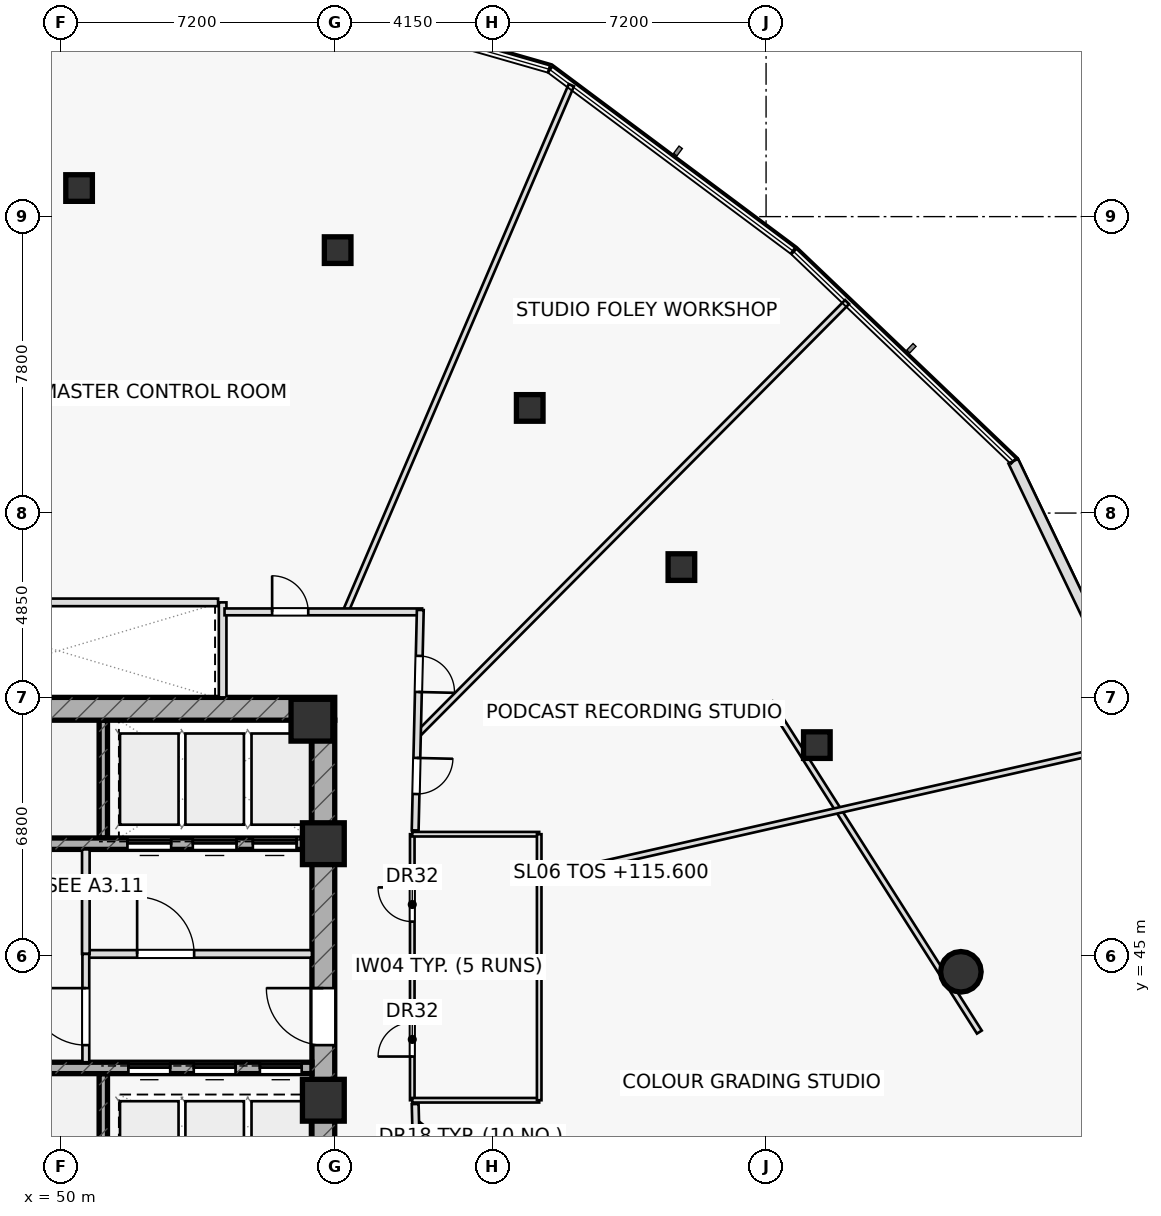
"""IFC4 building model, lengths in metres.
Left out: names, types, materials, properties, quantities, classifications, styles, units other than length and angle.
Written with IfcOpenShell. Run it as: python <this file> out.ifc"""

import sys

from ifc_helpers import new_model, si_unit, direction, frame, frame_2d, origin, origin_2d, place, context, subcontext, project, spatial, rectangle, hollow_rectangle, hollow_circle, extrude, element, fill, save


model = new_model("IFC4")
c1 = context("Model", 3, precision=1e-05, world=origin(), true_north=direction((0.0, 1.0)))
c2 = subcontext(c1, "Body", "Model", "MODEL_VIEW")
j1 = project(units=[si_unit("LENGTHUNIT", "METRE"), si_unit("PLANEANGLEUNIT", "RADIAN")], contexts=[c1])
p1 = place(None, origin())
s1 = spatial("IfcSite", under=j1, at=p1, CompositionType="ELEMENT")
p2 = place(p1, origin())
s2 = spatial("IfcBuilding", under=s1, at=p2, CompositionType="ELEMENT")
p3 = place(p2, frame((0.0, 0.0, 115.6)))
s3 = spatial("IfcBuildingStorey", under=s2, at=p3, CompositionType="ELEMENT", Elevation=115.6)
for number, where, z_axis, x_axis in (
    (1, (51.11, 48.1, 0.0), (0.0, 0.0, 1.0), (0.0, 1.0, 0.0)),
    (2, (51.11, 38.8, 0.0), (0.0, 0.0, 1.0), (0.0, 1.0, 0.0)),
):
    element("IfcWall", number, at=place(p3, frame(where, z_axis=z_axis, x_axis=x_axis)), inside=s3, PredefinedType="SHEAR", context=c2, shape_type="SweptSolid", body=[
        extrude(rectangle(XDim=3.1, YDim=0.22, at=frame_2d((1.55, 0.0))), origin(), (0.0, 0.0, 1.0), 3.55),
    ])
p4 = place(p3, frame((42.8, 51.5, 0.0), z_axis=(0.0, 0.0, 1.0), x_axis=(1.0, 0.0, 0.0)))
e3 = element("IfcWall", 3, at=p4, inside=s3, PredefinedType="SHEAR", context=c2, shape_type="SweptSolid", body=[
    extrude(rectangle(XDim=14.4, YDim=0.6, at=frame_2d((7.2, 0.0))), origin(), (0.0, 0.0, 1.0), 3.55),
])
p5 = place(p4, frame((0.88, 0.0, 0.0)))
e4 = element("IfcOpeningElement", 4, at=p5, cuts=e3, PredefinedType="OPENING", context=c2, shape_type="SweptSolid", body=[
    extrude(rectangle(XDim=1.05, YDim=2.2, at=frame_2d((0.525, 1.1))), frame((0.0, 0.31, 0.0), z_axis=(0.0, -1.0, 0.0), x_axis=(1.0, 0.0, 0.0)), (0.0, 0.0, 1.0), 0.62),
])
p6 = place(p3, frame((56.9, 38.8, 0.0), z_axis=(0.0, 0.0, 1.0), x_axis=(0.0, 1.0, 0.0)))
e5 = element("IfcWall", 5, at=p6, inside=s3, PredefinedType="SHEAR", context=c2, shape_type="SweptSolid", body=[
    extrude(rectangle(XDim=12.4, YDim=0.6, at=frame_2d((6.2, 0.0))), origin(), (0.0, 0.0, 1.0), 3.55),
])
p7 = place(p6, frame((3.85, 0.0, 0.0)))
e6 = element("IfcOpeningElement", 6, at=p7, cuts=e5, PredefinedType="OPENING", context=c2, shape_type="SweptSolid", body=[
    extrude(rectangle(XDim=1.5, YDim=2.2, at=frame_2d((0.75, 1.1))), frame((0.0, 0.31, 0.0), z_axis=(0.0, -1.0, 0.0), x_axis=(1.0, 0.0, 0.0)), (0.0, 0.0, 1.0), 0.62),
])
p8 = place(p3, frame((43.4, 47.95, 0.0), z_axis=(0.0, 0.0, 1.0), x_axis=(1.0, 0.0, 0.0)))
e7 = element("IfcWall", 7, at=p8, inside=s3, PredefinedType="SHEAR", context=c2, shape_type="SweptSolid", body=[
    extrude(rectangle(XDim=13.2, YDim=0.3, at=frame_2d((6.6, 0.0))), origin(), (0.0, 0.0, 1.0), 3.55),
])
p9 = place(p8, frame((8.345, 0.0, 0.0)))
e8 = element("IfcOpeningElement", 8, at=p9, cuts=e7, PredefinedType="OPENING", context=c2, shape_type="SweptSolid", body=[
    extrude(rectangle(XDim=1.15, YDim=2.2, at=frame_2d((0.575, 1.1))), frame((0.0, 0.16, 0.0), z_axis=(0.0, -1.0, 0.0), x_axis=(1.0, 0.0, 0.0)), (0.0, 0.0, 1.0), 0.32),
])
p10 = place(p8, frame((10.065, 0.0, 0.0)))
e9 = element("IfcOpeningElement", 9, at=p10, cuts=e7, PredefinedType="OPENING", context=c2, shape_type="SweptSolid", body=[
    extrude(rectangle(XDim=1.15, YDim=2.2, at=frame_2d((0.575, 1.1))), frame((0.0, 0.16, 0.0), z_axis=(0.0, -1.0, 0.0), x_axis=(1.0, 0.0, 0.0)), (0.0, 0.0, 1.0), 0.32),
])
p11 = place(p8, frame((11.645, 0.0, 0.0)))
e10 = element("IfcOpeningElement", 10, at=p11, cuts=e7, PredefinedType="OPENING", context=c2, shape_type="SweptSolid", body=[
    extrude(rectangle(XDim=1.15, YDim=2.2, at=frame_2d((0.575, 1.1))), frame((0.0, 0.16, 0.0), z_axis=(0.0, -1.0, 0.0), x_axis=(1.0, 0.0, 0.0)), (0.0, 0.0, 1.0), 0.32),
])
p12 = place(p3, frame((43.4, 42.05, 0.0), z_axis=(0.0, 0.0, 1.0), x_axis=(1.0, 0.0, 0.0)))
e11 = element("IfcWall", 11, at=p12, inside=s3, PredefinedType="SHEAR", context=c2, shape_type="SweptSolid", body=[
    extrude(rectangle(XDim=13.2, YDim=0.3, at=frame_2d((6.6, 0.0))), origin(), (0.0, 0.0, 1.0), 3.55),
])
p13 = place(p12, frame((8.37, 0.0, 0.0)))
e12 = element("IfcOpeningElement", 12, at=p13, cuts=e11, PredefinedType="OPENING", context=c2, shape_type="SweptSolid", body=[
    extrude(rectangle(XDim=1.1, YDim=2.15, at=frame_2d((0.55, 1.075))), frame((0.0, 0.16, 0.0), z_axis=(0.0, -1.0, 0.0), x_axis=(1.0, 0.0, 0.0)), (0.0, 0.0, 1.0), 0.32),
])
p14 = place(p12, frame((10.09, 0.0, 0.0)))
e13 = element("IfcOpeningElement", 13, at=p14, cuts=e11, PredefinedType="OPENING", context=c2, shape_type="SweptSolid", body=[
    extrude(rectangle(XDim=1.1, YDim=2.15, at=frame_2d((0.55, 1.075))), frame((0.0, 0.16, 0.0), z_axis=(0.0, -1.0, 0.0), x_axis=(1.0, 0.0, 0.0)), (0.0, 0.0, 1.0), 0.32),
])
p15 = place(p12, frame((11.83, 0.0, 0.0)))
e14 = element("IfcOpeningElement", 14, at=p15, cuts=e11, PredefinedType="OPENING", context=c2, shape_type="SweptSolid", body=[
    extrude(rectangle(XDim=1.1, YDim=2.15, at=frame_2d((0.55, 1.075))), frame((0.0, 0.16, 0.0), z_axis=(0.0, -1.0, 0.0), x_axis=(1.0, 0.0, 0.0)), (0.0, 0.0, 1.0), 0.32),
])
for number, where, z_axis, x_axis in (
    (15, (56.9, 47.95, 0.0), (0.0, 0.0, 1.0), (1.0, 0.0, 0.0)),
    (16, (56.6, 51.2, 0.0), (0.0, 0.0, 1.0), (1.0, 0.0, 0.0)),
    (17, (56.9, 41.2, 0.0), (0.0, 0.0, 1.0), (1.0, 0.0, 0.0)),
):
    element("IfcColumn", number, at=place(p3, frame(where, z_axis=z_axis, x_axis=x_axis)), inside=s3, PredefinedType="COLUMN", context=c2, shape_type="SweptSolid", body=[
        extrude(rectangle(XDim=1.1, YDim=1.1, at=origin_2d()), origin(), (0.0, 0.0, 1.0), 3.55),
    ])
p16 = place(p3, frame((73.676, 44.58, 0.0), z_axis=(0.0, 0.0, 1.0), x_axis=(1.0, 0.0, 0.0)))
e18 = element("IfcColumn", 18, at=p16, inside=s3, PredefinedType="COLUMN", context=c2, shape_type="SweptSolid", body=[
    extrude(hollow_circle(Radius=0.533, WallThickness=0.045, at=origin_2d()), origin(), (0.0, 0.0, 1.0), 3.55),
])
for number, where, z_axis, x_axis in (
    (19, (69.886, 50.544, 0.0), (0.0, 0.0, 1.0), (1.0, 0.0, 0.0)),
    (20, (66.322, 55.229, 0.0), (0.0, 0.0, 1.0), (1.0, 0.0, 0.0)),
    (21, (62.331, 59.416, 0.0), (0.0, 0.0, 1.0), (1.0, 0.0, 0.0)),
    (22, (57.277, 63.568, 0.0), (0.0, 0.0, 1.0), (1.0, 0.0, 0.0)),
    (23, (50.472, 65.202, 0.0), (0.0, 0.0, 1.0), (1.0, 0.0, 0.0)),
):
    element("IfcColumn", number, at=place(p3, frame(where, z_axis=z_axis, x_axis=x_axis)), inside=s3, PredefinedType="COLUMN", context=c2, shape_type="SweptSolid", body=[
        extrude(hollow_rectangle(XDim=0.7, YDim=0.7, WallThickness=0.04, at=origin_2d()), origin(), (0.0, 0.0, 1.0), 3.55),
    ])
p17 = place(p3, frame((54.25, 51.8, 0.0), z_axis=(0.0, 0.0, 1.0), x_axis=(0.0, 1.0, 0.0)))
e24 = element("IfcWall", 24, at=p17, inside=s3, PredefinedType="PARTITIONING", context=c2, shape_type="SweptSolid", body=[
    extrude(rectangle(XDim=2.5, YDim=0.2, at=frame_2d((1.25, 0.0))), origin(), (0.0, 0.0, 1.0), 3.55),
])
p18 = place(p3, frame((50.65, 45.05, 0.0), z_axis=(0.0, 0.0, 1.0), x_axis=(1.0, 0.0, 0.0)))
e25 = element("IfcWall", 25, at=p18, inside=s3, PredefinedType="PARTITIONING", context=c2, shape_type="SweptSolid", body=[
    extrude(rectangle(XDim=5.95, YDim=0.2, at=frame_2d((2.975, 0.0))), origin(), (0.0, 0.0, 1.0), 3.55),
])
p19 = place(p18, frame((1.35, 0.0, 0.0)))
e26 = element("IfcOpeningElement", 26, at=p19, cuts=e25, PredefinedType="OPENING", context=c2, shape_type="SweptSolid", body=[
    extrude(rectangle(XDim=1.5, YDim=2.2, at=frame_2d((0.75, 1.1))), frame((0.0, 0.11, 0.0), z_axis=(0.0, -1.0, 0.0), x_axis=(1.0, 0.0, 0.0)), (0.0, 0.0, 1.0), 0.22),
])
p20 = place(p3, frame((50.65, 45.05, 0.0), z_axis=(0.0, 0.0, 1.0), x_axis=(0.0, 1.0, 0.0)))
e27 = element("IfcWall", 27, at=p20, inside=s3, PredefinedType="PARTITIONING", context=c2, shape_type="SweptSolid", body=[
    extrude(rectangle(XDim=2.75, YDim=0.2, at=frame_2d((1.375, 0.0))), origin(), (0.0, 0.0, 1.0), 3.55),
])
p21 = place(p3, frame((50.65, 42.2, 0.0), z_axis=(0.0, 0.0, 1.0), x_axis=(0.0, 1.0, 0.0)))
e28 = element("IfcWall", 28, at=p21, inside=s3, PredefinedType="PARTITIONING", context=c2, shape_type="SweptSolid", body=[
    extrude(rectangle(XDim=2.85, YDim=0.18, at=frame_2d((1.425, 0.0))), origin(), (0.0, 0.0, 1.0), 3.55),
])
p22 = place(p21, frame((0.45, 0.0, 0.0)))
e29 = element("IfcOpeningElement", 29, at=p22, cuts=e28, PredefinedType="OPENING", context=c2, shape_type="SweptSolid", body=[
    extrude(rectangle(XDim=1.5, YDim=2.2, at=frame_2d((0.75, 1.1))), frame((0.0, 0.1, 0.0), z_axis=(0.0, -1.0, 0.0), x_axis=(1.0, 0.0, 0.0)), (0.0, 0.0, 1.0), 0.2),
])
p23 = place(p3, frame((74.163, 42.993, 0.0), z_axis=(0.0, 0.0, 1.0), x_axis=(-0.53628142437, 0.844039237166, 0.0)))
e30 = element("IfcWall", 30, at=p23, inside=s3, PredefinedType="PARTITIONING", context=c2, shape_type="SweptSolid", body=[
    extrude(rectangle(XDim=10.267, YDim=0.15, at=frame_2d((5.133, 0.0))), origin(), (0.0, 0.0, 1.0), 2.835),
])
p24 = place(p3, frame((59.24, 41.2, 0.0), z_axis=(0.0, 0.0, 1.0), x_axis=(0.0, 1.0, 0.0)))
e31 = element("IfcWall", 31, at=p24, inside=s3, PredefinedType="PARTITIONING", context=c2, shape_type="SweptSolid", body=[
    extrude(rectangle(XDim=7.0, YDim=0.12, at=frame_2d((3.5, 0.0))), origin(), (0.0, 0.0, 1.0), 3.55),
])
p25 = place(p24, frame((1.15, 0.0, 0.0)))
e32 = element("IfcOpeningElement", 32, at=p25, cuts=e31, PredefinedType="OPENING", context=c2, shape_type="SweptSolid", body=[
    extrude(rectangle(XDim=0.9, YDim=2.05, at=frame_2d((0.45, 1.025))), frame((0.0, 0.07, 0.0), z_axis=(0.0, -1.0, 0.0), x_axis=(1.0, 0.0, 0.0)), (0.0, 0.0, 1.0), 0.14),
])
p26 = place(p24, frame((4.7, 0.0, 0.0)))
e33 = element("IfcOpeningElement", 33, at=p26, cuts=e31, PredefinedType="OPENING", context=c2, shape_type="SweptSolid", body=[
    extrude(rectangle(XDim=0.9, YDim=2.05, at=frame_2d((0.45, 1.025))), frame((0.0, 0.07, 0.0), z_axis=(0.0, -1.0, 0.0), x_axis=(1.0, 0.0, 0.0)), (0.0, 0.0, 1.0), 0.14),
])
for number, where, z_axis, x_axis in (
    (34, (59.24, 41.2, 0.0), (0.0, 0.0, 1.0), (1.0, 0.0, 0.0)),
    (35, (59.24, 44.65, 0.0), (0.0, 0.0, 1.0), (1.0, 0.0, 0.0)),
    (36, (59.24, 48.2, 0.0), (0.0, 0.0, 1.0), (1.0, 0.0, 0.0)),
):
    element("IfcWall", number, at=place(p3, frame(where, z_axis=z_axis, x_axis=x_axis)), inside=s3, PredefinedType="PARTITIONING", context=c2, shape_type="SweptSolid", body=[
        extrude(rectangle(XDim=3.34, YDim=0.12, at=frame_2d((1.67, 0.0))), origin(), (0.0, 0.0, 1.0), 3.55),
    ])
p27 = place(p3, frame((62.58, 41.2, 0.0), z_axis=(0.0, 0.0, 1.0), x_axis=(0.0, 1.0, 0.0)))
e37 = element("IfcWall", 37, at=p27, inside=s3, PredefinedType="PARTITIONING", context=c2, shape_type="SweptSolid", body=[
    extrude(rectangle(XDim=7.0, YDim=0.12, at=frame_2d((3.5, 0.0))), origin(), (0.0, 0.0, 1.0), 3.55),
])
p28 = place(p3, frame((59.329, 40.614, 0.0), z_axis=(0.0, 0.0, 1.0), x_axis=(0.794014010307, -0.607899458329, 0.0)))
e38 = element("IfcWall", 38, at=p28, inside=s3, PredefinedType="PARTITIONING", context=c2, shape_type="SweptSolid", body=[
    extrude(rectangle(XDim=17.42, YDim=0.15, at=frame_2d((8.71, 0.0))), origin(), (0.0, 0.0, 1.0), 2.835),
])
p29 = place(p28, frame((1.35, 0.0, 0.0)))
e39 = element("IfcOpeningElement", 39, at=p29, cuts=e38, PredefinedType="OPENING", context=c2, shape_type="SweptSolid", body=[
    extrude(rectangle(XDim=0.95, YDim=2.05, at=frame_2d((0.475, 1.025))), frame((0.0, 0.085, 0.0), z_axis=(0.0, -1.0, 0.0), x_axis=(1.0, 0.0, 0.0)), (0.0, 0.0, 1.0), 0.17),
])
p30 = place(p3, frame((62.65, 47.055, 0.0), z_axis=(0.0, 0.0, 1.0), x_axis=(0.975173795811, 0.22144089045, 0.0)))
e40 = element("IfcWall", 40, at=p30, inside=s3, PredefinedType="PARTITIONING", context=c2, shape_type="SweptSolid", body=[
    extrude(rectangle(XDim=16.337, YDim=0.15, at=frame_2d((8.168, 0.0))), origin(), (0.0, 0.0, 1.0), 2.975),
])
p31 = place(p3, frame((59.375, 50.816, 0.0), z_axis=(0.0, 0.0, 1.0), x_axis=(0.704599563608, 0.709605140176, 0.0)))
e41 = element("IfcWall", 41, at=p31, inside=s3, PredefinedType="PARTITIONING", context=c2, shape_type="SweptSolid", body=[
    extrude(rectangle(XDim=16.047, YDim=0.15, at=frame_2d((8.023, 0.0))), origin(), (0.0, 0.0, 1.0), 2.835),
])
p32 = place(p3, frame((57.482, 54.05, 0.0), z_axis=(0.0, 0.0, 1.0), x_axis=(0.394188925316, 0.919029428886, 0.0)))
e42 = element("IfcWall", 42, at=p32, inside=s3, PredefinedType="PARTITIONING", context=c2, shape_type="SweptSolid", body=[
    extrude(rectangle(XDim=15.08, YDim=0.15, at=frame_2d((7.54, 0.0))), origin(), (0.0, 0.0, 1.0), 2.975),
])
p33 = place(p3, frame((54.3, 54.05, 0.0), z_axis=(0.0, 0.0, 1.0), x_axis=(1.0, 0.0, 0.0)))
e43 = element("IfcWall", 43, at=p33, inside=s3, PredefinedType="PARTITIONING", context=c2, shape_type="SweptSolid", body=[
    extrude(rectangle(XDim=5.2, YDim=0.18, at=frame_2d((2.6, 0.0))), origin(), (0.0, 0.0, 1.0), 2.835),
])
p34 = place(p33, frame((1.252, 0.0, 0.0)))
e44 = element("IfcOpeningElement", 44, at=p34, cuts=e43, PredefinedType="OPENING", context=c2, shape_type="SweptSolid", body=[
    extrude(rectangle(XDim=0.95, YDim=2.05, at=frame_2d((0.475, 1.025))), frame((0.0, 0.1, 0.0), z_axis=(0.0, -1.0, 0.0), x_axis=(1.0, 0.0, 0.0)), (0.0, 0.0, 1.0), 0.2),
])
p35 = place(p3, frame((59.451, 54.1, 0.0), z_axis=(0.0, 0.0, 1.0), x_axis=(-0.023271046154, -0.999729192537, 0.0)))
e45 = element("IfcWall", 45, at=p35, inside=s3, PredefinedType="PARTITIONING", context=c2, shape_type="SweptSolid", body=[
    extrude(rectangle(XDim=5.802, YDim=0.18, at=frame_2d((2.901, 0.0))), origin(), (0.0, 0.0, 1.0), 2.835),
])
p36 = place(p35, frame((1.208, 0.0, 0.0)))
e46 = element("IfcOpeningElement", 46, at=p36, cuts=e45, PredefinedType="OPENING", context=c2, shape_type="SweptSolid", body=[
    extrude(rectangle(XDim=0.95, YDim=2.05, at=frame_2d((0.475, 1.025))), frame((0.0, 0.1, 0.0), z_axis=(0.0, -1.0, 0.0), x_axis=(1.0, 0.0, 0.0)), (0.0, 0.0, 1.0), 0.2),
])
p37 = place(p35, frame((3.894, 0.0, 0.0)))
e47 = element("IfcOpeningElement", 47, at=p37, cuts=e45, PredefinedType="OPENING", context=c2, shape_type="SweptSolid", body=[
    extrude(rectangle(XDim=0.95, YDim=2.05, at=frame_2d((0.475, 1.025))), frame((0.0, 0.1, 0.0), z_axis=(0.0, -1.0, 0.0), x_axis=(1.0, 0.0, 0.0)), (0.0, 0.0, 1.0), 0.2),
])
p38 = place(p3, frame((59.316, 41.1, 0.0), z_axis=(0.0, 0.0, 1.0), x_axis=(0.025953695765, -0.999663146103, 0.0)))
e48 = element("IfcWall", 48, at=p38, inside=s3, PredefinedType="PARTITIONING", context=c2, shape_type="SweptSolid", body=[
    extrude(rectangle(XDim=5.202, YDim=0.18, at=frame_2d((2.601, 0.0))), origin(), (0.0, 0.0, 1.0), 2.835),
])
p39 = place(p38, frame((1.831, 0.0, 0.0)))
e49 = element("IfcOpeningElement", 49, at=p39, cuts=e48, PredefinedType="OPENING", context=c2, shape_type="SweptSolid", body=[
    extrude(rectangle(XDim=0.95, YDim=2.05, at=frame_2d((0.475, 1.025))), frame((0.0, 0.1, 0.0), z_axis=(0.0, -1.0, 0.0), x_axis=(1.0, 0.0, 0.0)), (0.0, 0.0, 1.0), 0.2),
])
p40 = place(p3, frame((78.798, 50.197, 0.0), z_axis=(0.0, 0.0, 1.0), x_axis=(-0.431907841394, 0.901917743778, 0.0)))
e50 = element("IfcWall", 50, at=p40, inside=s3, PredefinedType="STANDARD", context=c2, shape_type="SweptSolid", body=[
    extrude(rectangle(XDim=8.669, YDim=0.28, at=frame_2d((4.335, 0.0))), origin(), (0.0, 0.0, 1.0), 3.55),
])
p41 = place(p3, frame((45.82, 54.3, 0.0), z_axis=(0.0, 0.0, 1.0), x_axis=(1.0, 0.0, 0.0)))
e51 = element("IfcWall", 51, at=p41, inside=s3, PredefinedType="PARTITIONING", context=c2, shape_type="SweptSolid", body=[
    extrude(rectangle(XDim=8.31, YDim=0.2, at=frame_2d((4.155, 0.0))), origin(), (0.0, 0.0, 1.0), 3.55),
])
p42 = place(p7, origin())
e52 = element("IfcDoor", 52, at=p42, inside=s3, OperationType="SINGLE_SWING_RIGHT", PredefinedType="DOOR", context=c2, shape_type="SweptSolid", body=[
    extrude(rectangle(XDim=1.5, YDim=2.2, at=frame_2d((0.75, 1.1))), frame((0.0, 0.025, 0.0), z_axis=(0.0, -1.0, 0.0), x_axis=(1.0, 0.0, 0.0)), (0.0, 0.0, 1.0), 0.05),
])
fill(e6, e52)
p43 = place(p19, origin())
e53 = element("IfcDoor", 53, at=p43, inside=s3, OperationType="SINGLE_SWING_LEFT", PredefinedType="DOOR", context=c2, shape_type="SweptSolid", body=[
    extrude(rectangle(XDim=1.5, YDim=2.2, at=frame_2d((0.75, 1.1))), frame((0.0, 0.025, 0.0), z_axis=(0.0, -1.0, 0.0), x_axis=(1.0, 0.0, 0.0)), (0.0, 0.0, 1.0), 0.05),
])
fill(e26, e53)
p44 = place(p22, origin())
e54 = element("IfcDoor", 54, at=p44, inside=s3, OperationType="SINGLE_SWING_RIGHT", PredefinedType="DOOR", context=c2, shape_type="SweptSolid", body=[
    extrude(rectangle(XDim=1.5, YDim=2.2, at=frame_2d((0.75, 1.1))), frame((0.0, 0.025, 0.0), z_axis=(0.0, -1.0, 0.0), x_axis=(1.0, 0.0, 0.0)), (0.0, 0.0, 1.0), 0.05),
])
fill(e29, e54)
p45 = place(p25, origin())
e55 = element("IfcDoor", 55, at=p45, inside=s3, OperationType="SINGLE_SWING_LEFT", PredefinedType="DOOR", context=c2, shape_type="SweptSolid", body=[
    extrude(rectangle(XDim=0.9, YDim=2.05, at=frame_2d((0.45, 1.025))), frame((0.0, 0.025, 0.0), z_axis=(0.0, -1.0, 0.0), x_axis=(1.0, 0.0, 0.0)), (0.0, 0.0, 1.0), 0.05),
])
fill(e32, e55)
p46 = place(p26, origin())
e56 = element("IfcDoor", 56, at=p46, inside=s3, OperationType="SINGLE_SWING_RIGHT", PredefinedType="DOOR", context=c2, shape_type="SweptSolid", body=[
    extrude(rectangle(XDim=0.9, YDim=2.05, at=frame_2d((0.45, 1.025))), frame((0.0, 0.025, 0.0), z_axis=(0.0, -1.0, 0.0), x_axis=(1.0, 0.0, 0.0)), (0.0, 0.0, 1.0), 0.05),
])
fill(e33, e56)
p47 = place(p34, origin())
e57 = element("IfcDoor", 57, at=p47, inside=s3, OperationType="SINGLE_SWING_LEFT", PredefinedType="DOOR", context=c2, shape_type="SweptSolid", body=[
    extrude(rectangle(XDim=0.95, YDim=2.05, at=frame_2d((0.475, 1.025))), frame((0.0, 0.025, 0.0), z_axis=(0.0, -1.0, 0.0), x_axis=(1.0, 0.0, 0.0)), (0.0, 0.0, 1.0), 0.05),
])
fill(e44, e57)
p48 = place(p36, origin())
e58 = element("IfcDoor", 58, at=p48, inside=s3, OperationType="SINGLE_SWING_RIGHT", PredefinedType="DOOR", context=c2, shape_type="SweptSolid", body=[
    extrude(rectangle(XDim=0.95, YDim=2.05, at=frame_2d((0.475, 1.025))), frame((0.0, 0.025, 0.0), z_axis=(0.0, -1.0, 0.0), x_axis=(1.0, 0.0, 0.0)), (0.0, 0.0, 1.0), 0.05),
])
fill(e46, e58)
p49 = place(p37, origin())
e59 = element("IfcDoor", 59, at=p49, inside=s3, OperationType="SINGLE_SWING_LEFT", PredefinedType="DOOR", context=c2, shape_type="SweptSolid", body=[
    extrude(rectangle(XDim=0.95, YDim=2.05, at=frame_2d((0.475, 1.025))), frame((0.0, 0.025, 0.0), z_axis=(0.0, -1.0, 0.0), x_axis=(1.0, 0.0, 0.0)), (0.0, 0.0, 1.0), 0.05),
])
fill(e47, e59)
p50 = place(p9, origin())
e60 = element("IfcDoor", 60, at=p50, inside=s3, OperationType="SLIDING_TO_LEFT", PredefinedType="DOOR", context=c2, shape_type="SweptSolid", body=[
    extrude(rectangle(XDim=1.15, YDim=2.2, at=frame_2d((0.575, 1.1))), frame((0.0, 0.025, 0.0), z_axis=(0.0, -1.0, 0.0), x_axis=(1.0, 0.0, 0.0)), (0.0, 0.0, 1.0), 0.05),
])
fill(e8, e60)
p51 = place(p10, origin())
e61 = element("IfcDoor", 61, at=p51, inside=s3, OperationType="SLIDING_TO_LEFT", PredefinedType="DOOR", context=c2, shape_type="SweptSolid", body=[
    extrude(rectangle(XDim=1.15, YDim=2.2, at=frame_2d((0.575, 1.1))), frame((0.0, 0.025, 0.0), z_axis=(0.0, -1.0, 0.0), x_axis=(1.0, 0.0, 0.0)), (0.0, 0.0, 1.0), 0.05),
])
fill(e9, e61)
p52 = place(p11, origin())
e62 = element("IfcDoor", 62, at=p52, inside=s3, OperationType="SLIDING_TO_LEFT", PredefinedType="DOOR", context=c2, shape_type="SweptSolid", body=[
    extrude(rectangle(XDim=1.15, YDim=2.2, at=frame_2d((0.575, 1.1))), frame((0.0, 0.025, 0.0), z_axis=(0.0, -1.0, 0.0), x_axis=(1.0, 0.0, 0.0)), (0.0, 0.0, 1.0), 0.05),
])
fill(e10, e62)
p53 = place(p13, origin())
e63 = element("IfcDoor", 63, at=p53, inside=s3, OperationType="SLIDING_TO_LEFT", PredefinedType="DOOR", context=c2, shape_type="SweptSolid", body=[
    extrude(rectangle(XDim=1.1, YDim=2.15, at=frame_2d((0.55, 1.075))), frame((0.0, 0.025, 0.0), z_axis=(0.0, -1.0, 0.0), x_axis=(1.0, 0.0, 0.0)), (0.0, 0.0, 1.0), 0.05),
])
fill(e12, e63)
p54 = place(p14, origin())
e64 = element("IfcDoor", 64, at=p54, inside=s3, OperationType="SLIDING_TO_LEFT", PredefinedType="DOOR", context=c2, shape_type="SweptSolid", body=[
    extrude(rectangle(XDim=1.1, YDim=2.15, at=frame_2d((0.55, 1.075))), frame((0.0, 0.025, 0.0), z_axis=(0.0, -1.0, 0.0), x_axis=(1.0, 0.0, 0.0)), (0.0, 0.0, 1.0), 0.05),
])
fill(e13, e64)
p55 = place(p15, origin())
e65 = element("IfcDoor", 65, at=p55, inside=s3, OperationType="SLIDING_TO_LEFT", PredefinedType="DOOR", context=c2, shape_type="SweptSolid", body=[
    extrude(rectangle(XDim=1.1, YDim=2.15, at=frame_2d((0.55, 1.075))), frame((0.0, 0.025, 0.0), z_axis=(0.0, -1.0, 0.0), x_axis=(1.0, 0.0, 0.0)), (0.0, 0.0, 1.0), 0.05),
])
fill(e14, e65)
save(model, sys.argv[1])
